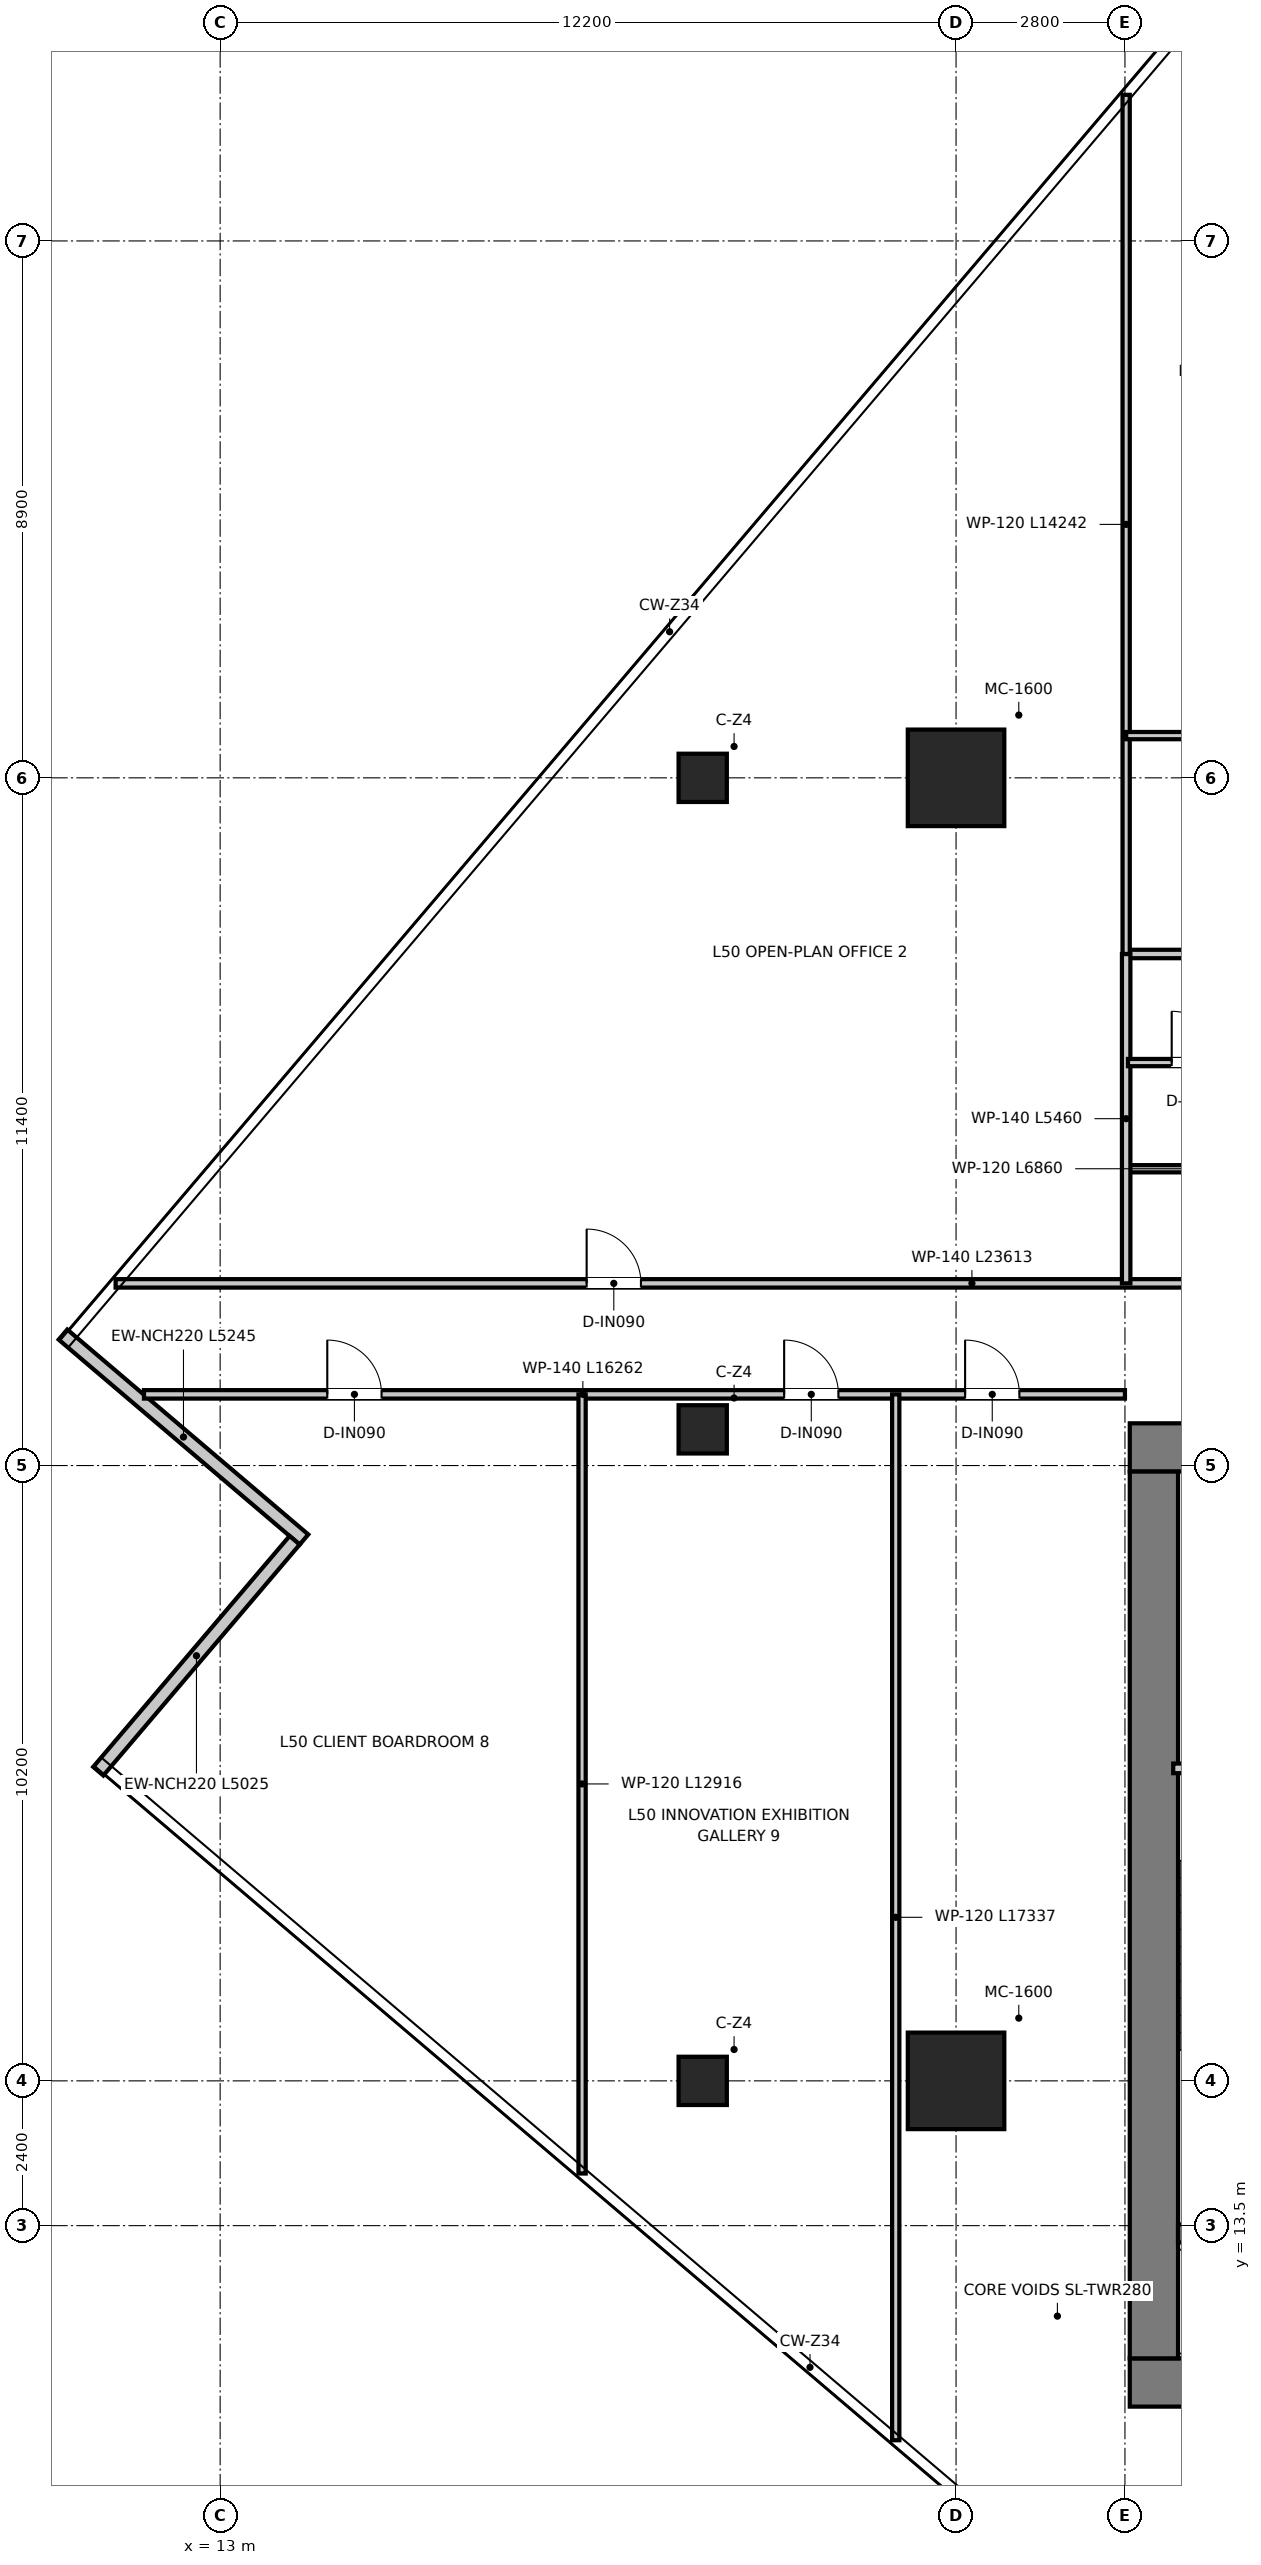
"""IFC4 building model, lengths in metres.
Left out: names, types, materials, properties, quantities, classifications, styles, units other than length and angle.
Written with IfcOpenShell. Run it as: python <this file> out.ifc"""

import sys

from ifc_helpers import new_model, si_unit, direction, frame, frame_2d, origin, origin_2d, place, context, subcontext, project, spatial, rectangle, extrude, source, transform, mapped, element, fill, save


model = new_model("IFC4")
c1 = context("Model", 3, precision=1e-05, world=origin(), true_north=direction((0.0, 1.0)))
c2 = subcontext(c1, "Body", "Model", "MODEL_VIEW")
j1 = project(units=[si_unit("LENGTHUNIT", "METRE"), si_unit("PLANEANGLEUNIT", "RADIAN")], contexts=[c1])
p1 = place(None, origin())
s1 = spatial("IfcSite", under=j1, at=p1, CompositionType="ELEMENT")
p2 = place(p1, origin())
s2 = spatial("IfcBuilding", under=s1, at=p2, CompositionType="ELEMENT")
p3 = place(p2, frame((0.0, 0.0, 207.3)))
s3 = spatial("IfcBuildingStorey", under=s2, at=p3, CompositionType="ELEMENT", Elevation=207.3)
p4 = place(p3, frame((28.08, 10.9, 0.0), z_axis=(0.0, 0.0, 1.0), x_axis=(1.0, 0.0, 0.0)))
e1 = element("IfcWall", 1, at=p4, inside=s3, PredefinedType="SHEAR", context=c2, shape_type="SweptSolid", body=[
    extrude(rectangle(XDim=15.84, YDim=0.8, at=frame_2d((7.92, 0.0))), origin(), (0.0, 0.0, 1.0), 3.95),
])
p5 = place(p3, frame((28.08, 26.4, 0.0), z_axis=(0.0, 0.0, 1.0), x_axis=(1.0, 0.0, 0.0)))
e2 = element("IfcWall", 2, at=p5, inside=s3, PredefinedType="SHEAR", context=c2, shape_type="SweptSolid", body=[
    extrude(rectangle(XDim=15.84, YDim=0.8, at=frame_2d((7.92, 0.0))), origin(), (0.0, 0.0, 1.0), 3.95),
])
p6 = place(p5, frame((7.22, 0.0, 0.0)))
e3 = element("IfcOpeningElement", 3, at=p6, cuts=e2, PredefinedType="OPENING", context=c2, shape_type="SweptSolid", body=[
    extrude(rectangle(XDim=1.4, YDim=2.2, at=frame_2d((0.7, 1.1))), frame((0.0, 0.41, 0.0), z_axis=(0.0, -1.0, 0.0), x_axis=(1.0, 0.0, 0.0)), (0.0, 0.0, 1.0), 0.82),
])
p7 = place(p5, frame((1.775, 0.0, 0.0)))
e4 = element("IfcOpeningElement", 4, at=p7, cuts=e2, PredefinedType="OPENING", context=c2, shape_type="SweptSolid", body=[
    extrude(rectangle(XDim=1.05, YDim=2.1, at=frame_2d((0.525, 1.05))), frame((0.0, 0.41, 0.0), z_axis=(0.0, -1.0, 0.0), x_axis=(1.0, 0.0, 0.0)), (0.0, 0.0, 1.0), 0.82),
])
p8 = place(p5, frame((13.015, 0.0, 0.0)))
e5 = element("IfcOpeningElement", 5, at=p8, cuts=e2, PredefinedType="OPENING", context=c2, shape_type="SweptSolid", body=[
    extrude(rectangle(XDim=1.05, YDim=2.1, at=frame_2d((0.525, 1.05))), frame((0.0, 0.41, 0.0), z_axis=(0.0, -1.0, 0.0), x_axis=(1.0, 0.0, 0.0)), (0.0, 0.0, 1.0), 0.82),
])
p9 = place(p3, frame((28.48, 11.3, 0.0), z_axis=(0.0, 0.0, 1.0), x_axis=(0.0, 1.0, 0.0)))
e6 = element("IfcWall", 6, at=p9, inside=s3, PredefinedType="SHEAR", context=c2, shape_type="SweptSolid", body=[
    extrude(rectangle(XDim=14.7, YDim=0.8, at=frame_2d((7.35, 0.0))), origin(), (0.0, 0.0, 1.0), 3.95),
])
p10 = place(p3, frame((28.88, 13.37, 0.0), z_axis=(0.0, 0.0, 1.0), x_axis=(1.0, 0.0, 0.0)))
e7 = element("IfcWall", 7, at=p10, inside=s3, PredefinedType="SHEAR", context=c2, shape_type="SweptSolid", body=[
    extrude(rectangle(XDim=3.1, YDim=0.3, at=frame_2d((1.55, 0.0))), origin(), (0.0, 0.0, 1.0), 3.95),
])
m1 = source(origin(), c2, "Body", "SweptSolid", [
    extrude(rectangle(XDim=1.6, YDim=1.6, at=origin_2d()), origin(), (0.0, 0.0, 1.0), 3.95),
])
for number, where, z_axis, x_axis in (
    (8, (25.2, 15.9, 0.0), (0.0, 0.0, 1.0), (1.0, 0.0, 0.0)),
    (9, (25.2, 37.5, 0.0), (0.0, 0.0, 1.0), (1.0, 0.0, 0.0)),
):
    element("IfcColumn", number, at=place(p3, frame(where, z_axis=z_axis, x_axis=x_axis)), inside=s3, PredefinedType="USERDEFINED", context=c2, shape_type="MappedRepresentation", body=[
        mapped(m1, transform((0.0, 0.0, 0.0), x_axis=(1.0, 0.0, 0.0), y_axis=(0.0, 1.0, 0.0), z_axis=(0.0, 0.0, 1.0), scale=1.0)),
    ])
m2 = source(origin(), c2, "Body", "SweptSolid", [
    extrude(rectangle(XDim=0.8, YDim=0.8, at=origin_2d()), origin(), (0.0, 0.0, 1.0), 3.95),
])
for number, where, z_axis, x_axis in (
    (10, (21.0, 15.9, 0.0), (0.0, 0.0, 1.0), (1.0, 0.0, 0.0)),
    (11, (21.0, 26.7, 0.0), (0.0, 0.0, 1.0), (1.0, 0.0, 0.0)),
    (12, (21.0, 37.5, 0.0), (0.0, 0.0, 1.0), (1.0, 0.0, 0.0)),
):
    element("IfcColumn", number, at=place(p3, frame(where, z_axis=z_axis, x_axis=x_axis)), inside=s3, PredefinedType="COLUMN", context=c2, shape_type="MappedRepresentation", body=[
        mapped(m2, transform((0.0, 0.0, 0.0), x_axis=(1.0, 0.0, 0.0), y_axis=(0.0, 1.0, 0.0), z_axis=(0.0, 0.0, 1.0), scale=1.0)),
    ])
p11 = place(p3, frame((10.394, 28.271, 0.0), z_axis=(0.0, 0.0, 1.0), x_axis=(0.761803778304, -0.647807844474, 0.0)))
e13 = element("IfcWall", 13, at=p11, inside=s3, PredefinedType="ELEMENTEDWALL", context=c2, shape_type="SweptSolid", body=[
    extrude(rectangle(XDim=5.245, YDim=0.22, at=frame_2d((2.623, 0.0))), origin(), (0.0, 0.0, 1.0), 3.67),
])
p12 = place(p3, frame((14.235, 24.861, 0.0), z_axis=(0.0, 0.0, 1.0), x_axis=(-0.647765464437, -0.761839814583, 0.0)))
e14 = element("IfcWall", 14, at=p12, inside=s3, PredefinedType="ELEMENTEDWALL", context=c2, shape_type="SweptSolid", body=[
    extrude(rectangle(XDim=5.025, YDim=0.22, at=frame_2d((2.513, 0.0))), origin(), (0.0, 0.0, 1.0), 3.67),
])
p13 = place(p3, frame((28.8, 21.08, 0.0), z_axis=(0.0, 0.0, 1.0), x_axis=(1.0, 0.0, 0.0)))
e15 = element("IfcWall", 15, at=p13, inside=s3, PredefinedType="PARTITIONING", context=c2, shape_type="SweptSolid", body=[
    extrude(rectangle(XDim=3.16, YDim=0.16, at=frame_2d((1.58, 0.0))), origin(), (0.0, 0.0, 1.0), 3.67),
])
p14 = place(p13, frame((1.055, 0.0, 0.0)))
e16 = element("IfcOpeningElement", 16, at=p14, cuts=e15, PredefinedType="OPENING", context=c2, shape_type="SweptSolid", body=[
    extrude(rectangle(XDim=1.05, YDim=2.1, at=frame_2d((0.525, 1.05))), frame((0.0, 0.09, 0.0), z_axis=(0.0, -1.0, 0.0), x_axis=(1.0, 0.0, 0.0)), (0.0, 0.0, 1.0), 0.18),
])
p15 = place(p3, frame((11.267, 29.12, 0.0), z_axis=(0.0, 0.0, 1.0), x_axis=(1.0, 0.0, 0.0)))
e17 = element("IfcWall", 17, at=p15, inside=s3, PredefinedType="PARTITIONING", context=c2, shape_type="SweptSolid", body=[
    extrude(rectangle(XDim=23.613, YDim=0.14, at=frame_2d((11.807, 0.0))), origin(), (0.0, 0.0, 1.0), 3.03),
])
p16 = place(p15, frame((19.683, 0.0, 0.0)))
e18 = element("IfcOpeningElement", 18, at=p16, cuts=e17, PredefinedType="OPENING", context=c2, shape_type="SweptSolid", body=[
    extrude(rectangle(XDim=0.9, YDim=2.1, at=frame_2d((0.45, 1.05))), frame((0.0, 0.08, 0.0), z_axis=(0.0, -1.0, 0.0), x_axis=(1.0, 0.0, 0.0)), (0.0, 0.0, 1.0), 0.16),
])
p17 = place(p15, frame((7.809, 0.0, 0.0)))
e19 = element("IfcOpeningElement", 19, at=p17, cuts=e17, PredefinedType="OPENING", context=c2, shape_type="SweptSolid", body=[
    extrude(rectangle(XDim=0.9, YDim=2.1, at=frame_2d((0.45, 1.05))), frame((0.0, 0.08, 0.0), z_axis=(0.0, -1.0, 0.0), x_axis=(1.0, 0.0, 0.0)), (0.0, 0.0, 1.0), 0.16),
])
p18 = place(p3, frame((11.738, 27.28, 0.0), z_axis=(0.0, 0.0, 1.0), x_axis=(1.0, 0.0, 0.0)))
e20 = element("IfcWall", 20, at=p18, inside=s3, PredefinedType="PARTITIONING", context=c2, shape_type="SweptSolid", body=[
    extrude(rectangle(XDim=16.262, YDim=0.14, at=frame_2d((8.131, 0.0))), origin(), (0.0, 0.0, 1.0), 3.03),
])
p19 = place(p18, frame((3.038, 0.0, 0.0)))
e21 = element("IfcOpeningElement", 21, at=p19, cuts=e20, PredefinedType="OPENING", context=c2, shape_type="SweptSolid", body=[
    extrude(rectangle(XDim=0.9, YDim=2.1, at=frame_2d((0.45, 1.05))), frame((0.0, 0.08, 0.0), z_axis=(0.0, -1.0, 0.0), x_axis=(1.0, 0.0, 0.0)), (0.0, 0.0, 1.0), 0.16),
])
p20 = place(p18, frame((10.612, 0.0, 0.0)))
e22 = element("IfcOpeningElement", 22, at=p20, cuts=e20, PredefinedType="OPENING", context=c2, shape_type="SweptSolid", body=[
    extrude(rectangle(XDim=0.9, YDim=2.1, at=frame_2d((0.45, 1.05))), frame((0.0, 0.08, 0.0), z_axis=(0.0, -1.0, 0.0), x_axis=(1.0, 0.0, 0.0)), (0.0, 0.0, 1.0), 0.16),
])
p21 = place(p18, frame((13.612, 0.0, 0.0)))
e23 = element("IfcOpeningElement", 23, at=p21, cuts=e20, PredefinedType="OPENING", context=c2, shape_type="SweptSolid", body=[
    extrude(rectangle(XDim=0.9, YDim=2.1, at=frame_2d((0.45, 1.05))), frame((0.0, 0.08, 0.0), z_axis=(0.0, -1.0, 0.0), x_axis=(1.0, 0.0, 0.0)), (0.0, 0.0, 1.0), 0.16),
])
p22 = place(p3, frame((28.02, 31.02, 0.0), z_axis=(0.0, 0.0, 1.0), x_axis=(1.0, 0.0, 0.0)))
e24 = element("IfcWall", 24, at=p22, inside=s3, PredefinedType="PARTITIONING", context=c2, shape_type="SweptSolid", body=[
    extrude(rectangle(XDim=6.86, YDim=0.12, at=frame_2d((3.43, 0.0))), origin(), (0.0, 0.0, 1.0), 3.18),
])
p23 = place(p3, frame((28.02, 34.58, 0.0), z_axis=(0.0, 0.0, 1.0), x_axis=(1.0, 0.0, 0.0)))
e25 = element("IfcWall", 25, at=p23, inside=s3, PredefinedType="PARTITIONING", context=c2, shape_type="SweptSolid", body=[
    extrude(rectangle(XDim=6.86, YDim=0.14, at=frame_2d((3.43, 0.0))), origin(), (0.0, 0.0, 1.0), 3.18),
])
p24 = place(p3, frame((28.02, 29.12, 0.0), z_axis=(0.0, 0.0, 1.0), x_axis=(0.0, 1.0, 0.0)))
e26 = element("IfcWall", 26, at=p24, inside=s3, PredefinedType="PARTITIONING", context=c2, shape_type="SweptSolid", body=[
    extrude(rectangle(XDim=5.46, YDim=0.14, at=frame_2d((2.73, 0.0))), origin(), (0.0, 0.0, 1.0), 3.37),
])
p25 = place(p3, frame((28.05, 32.78, 0.0), z_axis=(0.0, 0.0, 1.0), x_axis=(1.0, 0.0, 0.0)))
e27 = element("IfcWall", 27, at=p25, inside=s3, PredefinedType="PARTITIONING", context=c2, shape_type="SweptSolid", body=[
    extrude(rectangle(XDim=6.8, YDim=0.12, at=frame_2d((3.4, 0.0))), origin(), (0.0, 0.0, 1.0), 3.18),
])
p26 = place(p25, frame((0.725, 0.0, 0.0)))
e28 = element("IfcOpeningElement", 28, at=p26, cuts=e27, PredefinedType="OPENING", context=c2, shape_type="SweptSolid", body=[
    extrude(rectangle(XDim=0.85, YDim=2.1, at=frame_2d((0.425, 1.05))), frame((0.0, 0.07, 0.0), z_axis=(0.0, -1.0, 0.0), x_axis=(1.0, 0.0, 0.0)), (0.0, 0.0, 1.0), 0.14),
])
p27 = place(p25, frame((3.065, 0.0, 0.0)))
e29 = element("IfcOpeningElement", 29, at=p27, cuts=e27, PredefinedType="OPENING", context=c2, shape_type="SweptSolid", body=[
    extrude(rectangle(XDim=0.85, YDim=2.1, at=frame_2d((0.425, 1.05))), frame((0.0, 0.07, 0.0), z_axis=(0.0, -1.0, 0.0), x_axis=(1.0, 0.0, 0.0)), (0.0, 0.0, 1.0), 0.14),
])
p28 = place(p25, frame((5.25, 0.0, 0.0)))
e30 = element("IfcOpeningElement", 30, at=p28, cuts=e27, PredefinedType="OPENING", context=c2, shape_type="SweptSolid", body=[
    extrude(rectangle(XDim=0.9, YDim=2.1, at=frame_2d((0.45, 1.05))), frame((0.0, 0.07, 0.0), z_axis=(0.0, -1.0, 0.0), x_axis=(1.0, 0.0, 0.0)), (0.0, 0.0, 1.0), 0.14),
])
p29 = place(p3, frame((28.02, 34.58, 0.0), z_axis=(0.0, 0.0, 1.0), x_axis=(0.0, 1.0, 0.0)))
e31 = element("IfcWall", 31, at=p29, inside=s3, PredefinedType="PARTITIONING", context=c2, shape_type="SweptSolid", body=[
    extrude(rectangle(XDim=14.242, YDim=0.12, at=frame_2d((7.121, 0.0))), origin(), (0.0, 0.0, 1.0), 3.03),
])
p30 = place(p3, frame((28.02, 38.2, 0.0), z_axis=(0.0, 0.0, 1.0), x_axis=(1.0, 0.0, 0.0)))
e32 = element("IfcWall", 32, at=p30, inside=s3, PredefinedType="PARTITIONING", context=c2, shape_type="SweptSolid", body=[
    extrude(rectangle(XDim=6.86, YDim=0.12, at=frame_2d((3.43, 0.0))), origin(), (0.0, 0.0, 1.0), 3.18),
])
p31 = place(p3, frame((19.0, 14.364, 0.0), z_axis=(0.0, 0.0, 1.0), x_axis=(0.0, 1.0, 0.0)))
e33 = element("IfcWall", 33, at=p31, inside=s3, PredefinedType="PARTITIONING", context=c2, shape_type="SweptSolid", body=[
    extrude(rectangle(XDim=12.916, YDim=0.12, at=frame_2d((6.458, 0.0))), origin(), (0.0, 0.0, 1.0), 3.67),
])
p32 = place(p3, frame((24.2, 9.943, 0.0), z_axis=(0.0, 0.0, 1.0), x_axis=(0.0, 1.0, 0.0)))
e34 = element("IfcWall", 34, at=p32, inside=s3, PredefinedType="PARTITIONING", context=c2, shape_type="SweptSolid", body=[
    extrude(rectangle(XDim=17.337, YDim=0.12, at=frame_2d((8.669, 0.0))), origin(), (0.0, 0.0, 1.0), 3.18),
])
p33 = place(p26, origin())
e35 = element("IfcDoor", 35, at=p33, inside=s3, OperationType="SINGLE_SWING_LEFT", PredefinedType="DOOR", context=c2, shape_type="SweptSolid", body=[
    extrude(rectangle(XDim=0.85, YDim=2.1, at=frame_2d((0.425, 1.05))), frame((0.0, 0.025, 0.0), z_axis=(0.0, -1.0, 0.0), x_axis=(1.0, 0.0, 0.0)), (0.0, 0.0, 1.0), 0.05),
])
fill(e28, e35)
p34 = place(p17, origin())
e36 = element("IfcDoor", 36, at=p34, inside=s3, OperationType="SINGLE_SWING_LEFT", PredefinedType="DOOR", context=c2, shape_type="SweptSolid", body=[
    extrude(rectangle(XDim=0.9, YDim=2.1, at=frame_2d((0.45, 1.05))), frame((0.0, 0.025, 0.0), z_axis=(0.0, -1.0, 0.0), x_axis=(1.0, 0.0, 0.0)), (0.0, 0.0, 1.0), 0.05),
])
fill(e19, e36)
p35 = place(p19, origin())
e37 = element("IfcDoor", 37, at=p35, inside=s3, OperationType="SINGLE_SWING_LEFT", PredefinedType="DOOR", context=c2, shape_type="SweptSolid", body=[
    extrude(rectangle(XDim=0.9, YDim=2.1, at=frame_2d((0.45, 1.05))), frame((0.0, 0.025, 0.0), z_axis=(0.0, -1.0, 0.0), x_axis=(1.0, 0.0, 0.0)), (0.0, 0.0, 1.0), 0.05),
])
fill(e21, e37)
p36 = place(p20, origin())
e38 = element("IfcDoor", 38, at=p36, inside=s3, OperationType="SINGLE_SWING_LEFT", PredefinedType="DOOR", context=c2, shape_type="SweptSolid", body=[
    extrude(rectangle(XDim=0.9, YDim=2.1, at=frame_2d((0.45, 1.05))), frame((0.0, 0.025, 0.0), z_axis=(0.0, -1.0, 0.0), x_axis=(1.0, 0.0, 0.0)), (0.0, 0.0, 1.0), 0.05),
])
fill(e22, e38)
p37 = place(p21, origin())
e39 = element("IfcDoor", 39, at=p37, inside=s3, OperationType="SINGLE_SWING_LEFT", PredefinedType="DOOR", context=c2, shape_type="SweptSolid", body=[
    extrude(rectangle(XDim=0.9, YDim=2.1, at=frame_2d((0.45, 1.05))), frame((0.0, 0.025, 0.0), z_axis=(0.0, -1.0, 0.0), x_axis=(1.0, 0.0, 0.0)), (0.0, 0.0, 1.0), 0.05),
])
fill(e23, e39)
save(model, sys.argv[1])
